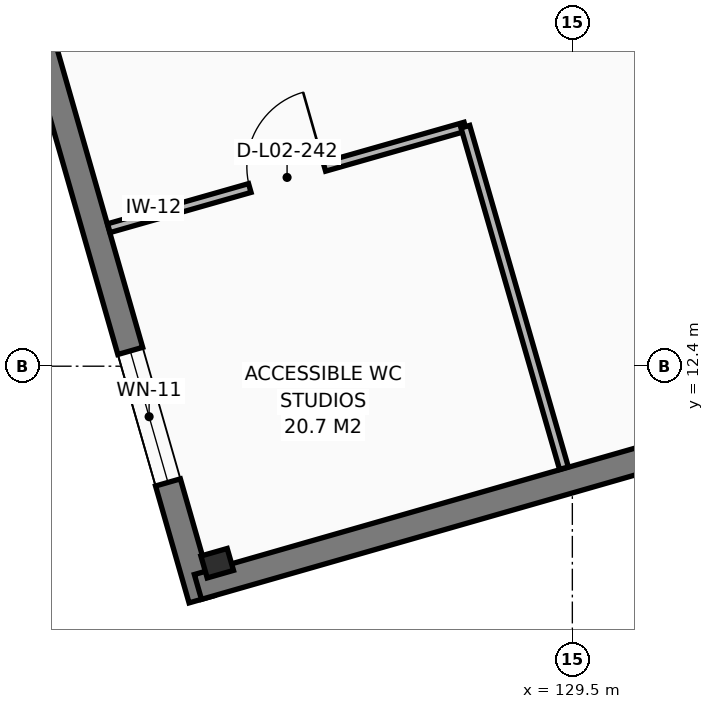
"""IFC4 building model, lengths in metres.
Left out: names, types, materials, properties, quantities, classifications, styles, units other than length and angle.
Written with IfcOpenShell. Run it as: python <this file> out.ifc"""

import sys

from ifc_helpers import new_model, si_unit, direction, frame, frame_2d, origin, origin_2d, place, context, subcontext, project, spatial, rectangle, i_section, extrude, element, fill, save


model = new_model("IFC4")
c1 = context("Model", 3, precision=1e-05, world=origin(), true_north=direction((0.0, 1.0)))
c2 = subcontext(c1, "Body", "Model", "MODEL_VIEW")
j1 = project(units=[si_unit("LENGTHUNIT", "METRE"), si_unit("PLANEANGLEUNIT", "RADIAN")], contexts=[c1])
p1 = place(None, origin())
s1 = spatial("IfcSite", under=j1, at=p1, CompositionType="ELEMENT")
p2 = place(p1, origin())
s2 = spatial("IfcBuilding", under=s1, at=p2, CompositionType="ELEMENT")
p3 = place(p2, frame((0.0, 0.0, 9.52)))
s3 = spatial("IfcBuildingStorey", under=s2, at=p3, CompositionType="ELEMENT", Elevation=9.52)
p4 = place(p3, frame((124.827, 9.808, 0.0), z_axis=(0.0, 0.0, 1.0), x_axis=(0.961261695938, 0.275637355817, 0.0)))
e1 = element("IfcColumn", 1, at=p4, inside=s3, PredefinedType="COLUMN", context=c2, shape_type="SweptSolid", body=[
    extrude(i_section(OverallWidth=0.3, OverallDepth=0.36, WebThickness=0.012, FlangeThickness=0.022, FilletRadius=0.027, at=origin_2d()), origin(), (0.0, 0.0, 1.0), 4.16),
])
p5 = place(p3, frame((124.621, 9.333, 0.0), z_axis=(0.0, 0.0, 1.0), x_axis=(-0.275644006198, 0.961259788947, 0.0)))
e2 = element("IfcWall", 2, at=p5, inside=s3, PredefinedType="SOLIDWALL", context=c2, shape_type="SweptSolid", body=[
    extrude(rectangle(XDim=26.83, YDim=0.34, at=frame_2d((13.415, 0.0))), origin(), (0.0, 0.0, 1.0), 3.92),
])
p6 = place(p5, frame((1.6, 0.0, 0.85)))
e3 = element("IfcOpeningElement", 3, at=p6, cuts=e2, PredefinedType="OPENING", context=c2, shape_type="SweptSolid", body=[
    extrude(rectangle(XDim=1.8, YDim=1.7, at=frame_2d((0.9, 0.85))), frame((0.0, 0.18, 0.0), z_axis=(0.0, -1.0, 0.0), x_axis=(1.0, 0.0, 0.0)), (0.0, 0.0, 1.0), 0.36),
])
p7 = place(p5, frame((13.415, 0.0, 0.85)))
e4 = element("IfcOpeningElement", 4, at=p7, cuts=e2, PredefinedType="OPENING", context=c2, shape_type="SweptSolid", body=[
    extrude(rectangle(XDim=2.0, YDim=1.3, at=frame_2d((1.0, 0.65))), frame((0.0, 0.18, 0.0), z_axis=(0.0, -1.0, 0.0), x_axis=(1.0, 0.0, 0.0)), (0.0, 0.0, 1.0), 0.36),
])
p8 = place(p5, frame((19.323, 0.0, 0.85)))
e5 = element("IfcOpeningElement", 5, at=p8, cuts=e2, PredefinedType="OPENING", context=c2, shape_type="SweptSolid", body=[
    extrude(rectangle(XDim=1.2, YDim=1.4, at=frame_2d((0.6, 0.7))), frame((0.0, 0.18, 0.0), z_axis=(0.0, -1.0, 0.0), x_axis=(1.0, 0.0, 0.0)), (0.0, 0.0, 1.0), 0.36),
])
p9 = place(p3, frame((160.938, 19.924, 0.0), z_axis=(0.0, 0.0, 1.0), x_axis=(-0.961260735733, -0.275640704428, 0.0)))
e6 = element("IfcWall", 6, at=p9, inside=s3, PredefinedType="SOLIDWALL", context=c2, shape_type="SweptSolid", body=[
    extrude(rectangle(XDim=37.83, YDim=0.34, at=frame_2d((18.915, 0.0))), origin(), (0.0, 0.0, 1.0), 3.92),
])
p10 = place(p9, frame((1.6, 0.0, 0.85)))
e7 = element("IfcOpeningElement", 7, at=p10, cuts=e6, PredefinedType="OPENING", context=c2, shape_type="SweptSolid", body=[
    extrude(rectangle(XDim=1.3, YDim=1.6, at=frame_2d((0.65, 0.8))), frame((0.0, 0.18, 0.0), z_axis=(0.0, -1.0, 0.0), x_axis=(1.0, 0.0, 0.0)), (0.0, 0.0, 1.0), 0.36),
])
p11 = place(p9, frame((8.526, 0.0, 0.85)))
e8 = element("IfcOpeningElement", 8, at=p11, cuts=e6, PredefinedType="OPENING", context=c2, shape_type="SweptSolid", body=[
    extrude(rectangle(XDim=1.6, YDim=1.6, at=frame_2d((0.8, 0.8))), frame((0.0, 0.18, 0.0), z_axis=(0.0, -1.0, 0.0), x_axis=(1.0, 0.0, 0.0)), (0.0, 0.0, 1.0), 0.36),
])
p12 = place(p9, frame((15.452, 0.0, 0.85)))
e9 = element("IfcOpeningElement", 9, at=p12, cuts=e6, PredefinedType="OPENING", context=c2, shape_type="SweptSolid", body=[
    extrude(rectangle(XDim=1.9, YDim=1.6, at=frame_2d((0.95, 0.8))), frame((0.0, 0.18, 0.0), z_axis=(0.0, -1.0, 0.0), x_axis=(1.0, 0.0, 0.0)), (0.0, 0.0, 1.0), 0.36),
])
p13 = place(p9, frame((29.304, 0.0, 0.85)))
e10 = element("IfcOpeningElement", 10, at=p13, cuts=e6, PredefinedType="OPENING", context=c2, shape_type="SweptSolid", body=[
    extrude(rectangle(XDim=1.35, YDim=1.5, at=frame_2d((0.675, 0.75))), frame((0.0, 0.18, 0.0), z_axis=(0.0, -1.0, 0.0), x_axis=(1.0, 0.0, 0.0)), (0.0, 0.0, 1.0), 0.36),
])
p14 = place(p3, frame((123.401, 14.216, 0.0), z_axis=(0.0, 0.0, 1.0), x_axis=(0.961754062565, 0.273914444926, 0.0)))
e11 = element("IfcWall", 11, at=p14, inside=s3, PredefinedType="PARTITIONING", context=c2, shape_type="SweptSolid", body=[
    extrude(rectangle(XDim=4.877, YDim=0.12, at=frame_2d((2.438, 0.0))), origin(), (0.0, 0.0, 1.0), 3.46),
])
p15 = place(p14, frame((1.929, 0.0, 0.0)))
e12 = element("IfcOpeningElement", 12, at=p15, cuts=e11, PredefinedType="OPENING", context=c2, shape_type="SweptSolid", body=[
    extrude(rectangle(XDim=1.02, YDim=2.12, at=frame_2d((0.51, 1.06))), frame((0.0, 0.07, 0.0), z_axis=(0.0, -1.0, 0.0), x_axis=(1.0, 0.0, 0.0)), (0.0, 0.0, 1.0), 0.14),
])
p16 = place(p3, frame((128.092, 15.552, 0.0), z_axis=(0.0, 0.0, 1.0), x_axis=(0.277429379743, -0.960746032652, 0.0)))
e13 = element("IfcWall", 13, at=p16, inside=s3, PredefinedType="PARTITIONING", context=c2, shape_type="SweptSolid", body=[
    extrude(rectangle(XDim=4.677, YDim=0.12, at=frame_2d((2.339, 0.0))), origin(), (0.0, 0.0, 1.0), 3.41),
])
p17 = place(p6, origin())
e14 = element("IfcWindow", 14, at=p17, inside=s3, PartitioningType="SINGLE_PANEL", PredefinedType="WINDOW", context=c2, shape_type="SweptSolid", body=[
    extrude(rectangle(XDim=1.8, YDim=1.7, at=frame_2d((0.9, 0.85))), frame((0.0, 0.03, 0.0), z_axis=(0.0, -1.0, 0.0), x_axis=(1.0, 0.0, 0.0)), (0.0, 0.0, 1.0), 0.06),
])
fill(e3, e14)
p18 = place(p15, origin())
e15 = element("IfcDoor", 15, at=p18, inside=s3, OperationType="SINGLE_SWING_RIGHT", PredefinedType="DOOR", context=c2, shape_type="SweptSolid", body=[
    extrude(rectangle(XDim=1.02, YDim=2.12, at=frame_2d((0.51, 1.06))), frame((0.0, 0.025, 0.0), z_axis=(0.0, -1.0, 0.0), x_axis=(1.0, 0.0, 0.0)), (0.0, 0.0, 1.0), 0.05),
])
fill(e12, e15)
save(model, sys.argv[1])
